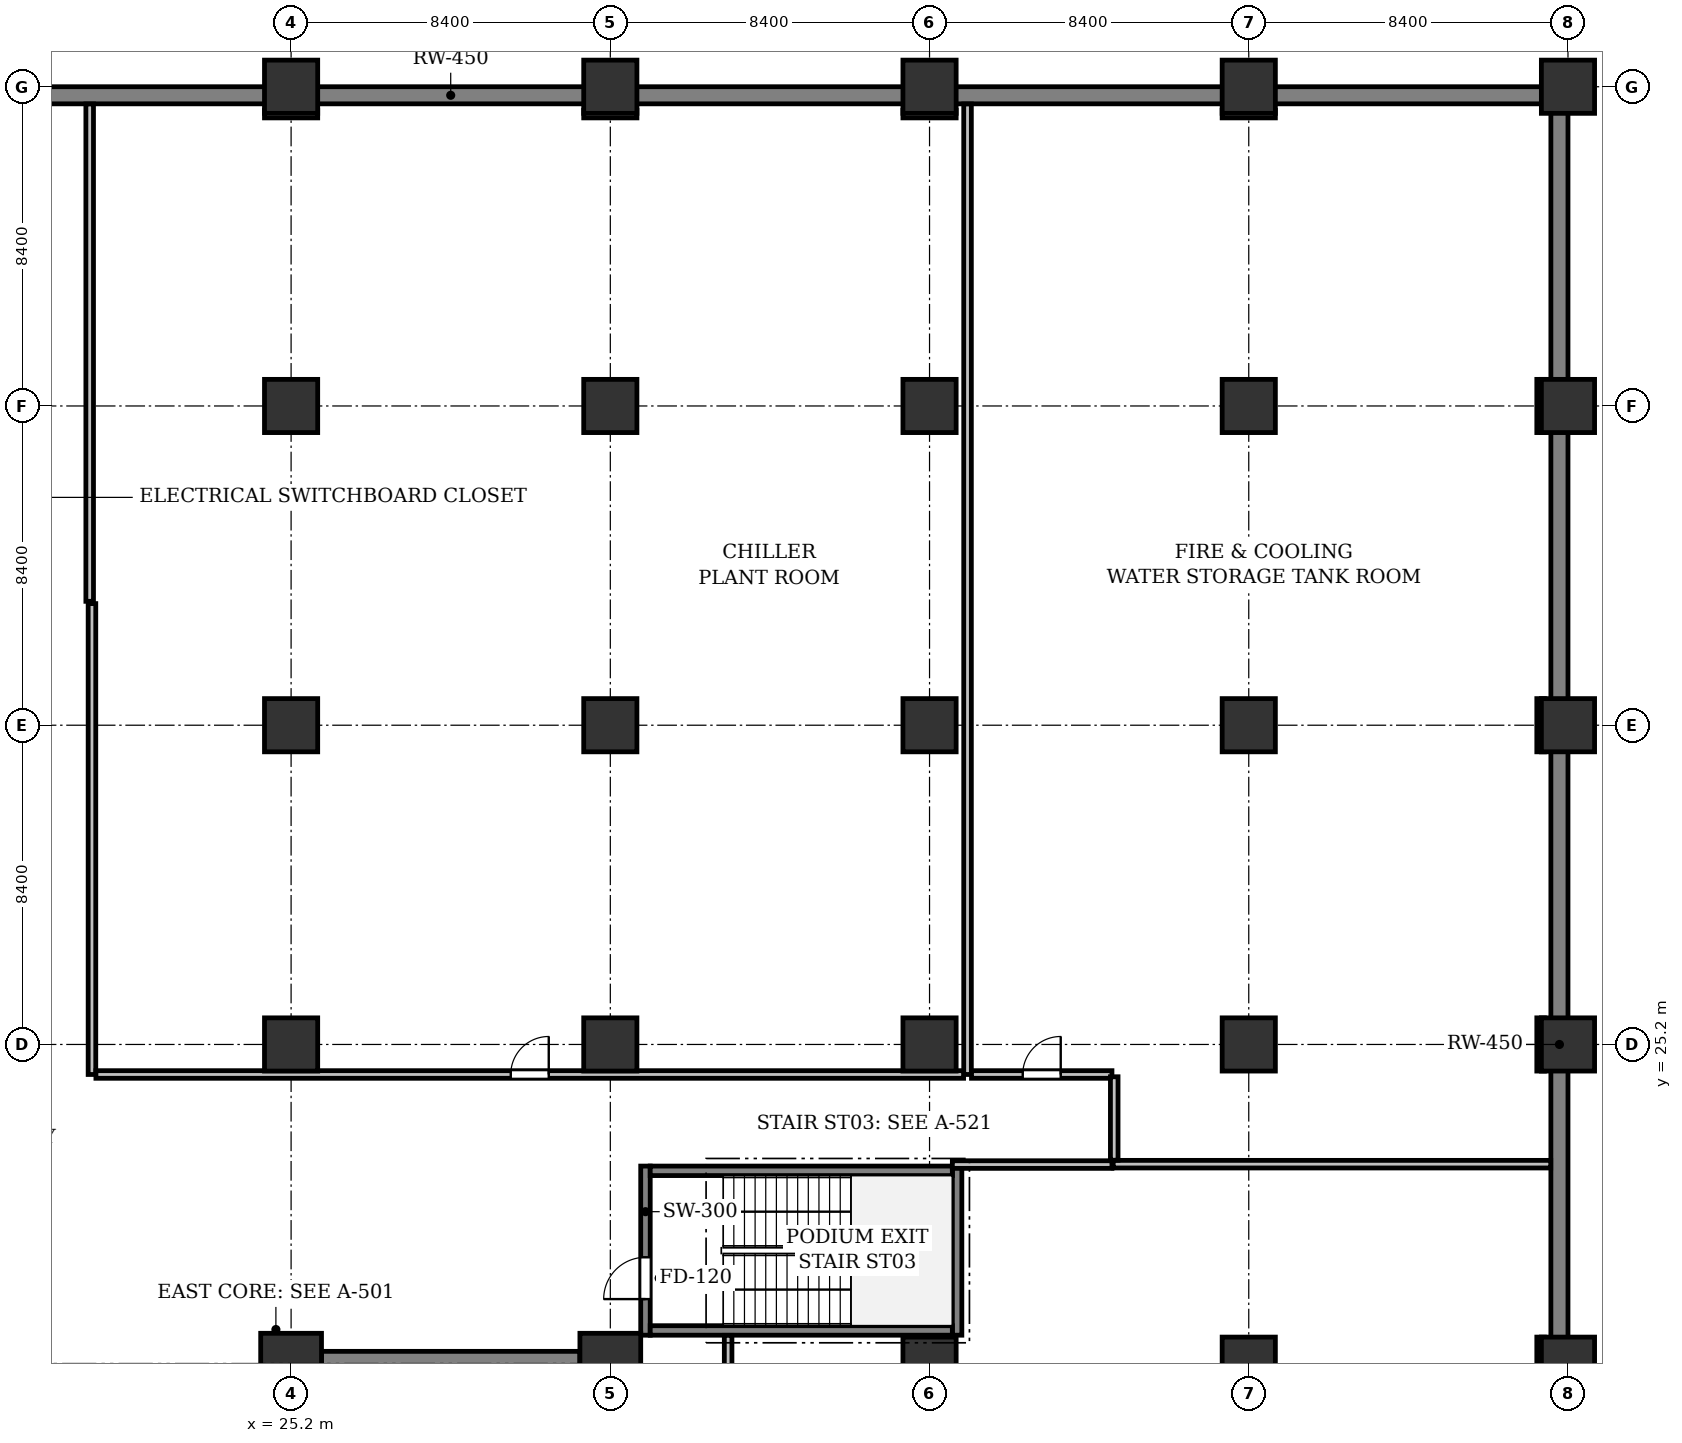
"""IFC4 building model, lengths in metres.
Left out: names, types, materials, properties, quantities, classifications, styles, units other than length and angle.
Written with IfcOpenShell. Run it as: python <this file> out.ifc"""

import sys

from ifc_helpers import new_model, si_unit, direction, frame, frame_2d, origin, origin_2d, place, context, subcontext, project, spatial, rectangle, extrude, element, fill, save


model = new_model("IFC4")
c1 = context("Model", 3, precision=1e-05, world=origin(), true_north=direction((0.0, 1.0)))
c2 = subcontext(c1, "Body", "Model", "MODEL_VIEW")
j1 = project(units=[si_unit("LENGTHUNIT", "METRE"), si_unit("PLANEANGLEUNIT", "RADIAN")], contexts=[c1])
p1 = place(None, origin())
s1 = spatial("IfcSite", under=j1, at=p1, CompositionType="ELEMENT")
p2 = place(p1, origin())
s2 = spatial("IfcBuilding", under=s1, at=p2, CompositionType="ELEMENT")
p3 = place(p2, frame((0.0, 0.0, -9.6)))
s3 = spatial("IfcBuildingStorey", under=s2, at=p3, CompositionType="ELEMENT", Elevation=-9.6)
p4 = place(p3, frame((0.0, 50.175, 0.0), z_axis=(0.0, 0.0, 1.0), x_axis=(1.0, 0.0, 0.0)))
e1 = element("IfcWall", 1, at=p4, inside=s3, PredefinedType="SOLIDWALL", context=c2, shape_type="SweptSolid", body=[
    extrude(rectangle(XDim=58.8, YDim=0.45, at=frame_2d((29.4, 0.0))), origin(), (0.0, 0.0, 1.0), 4.48),
])
p5 = place(p3, frame((58.575, 0.45, 0.0), z_axis=(0.0, 0.0, 1.0), x_axis=(0.0, 1.0, 0.0)))
e2 = element("IfcWall", 2, at=p5, inside=s3, PredefinedType="SOLIDWALL", context=c2, shape_type="SweptSolid", body=[
    extrude(rectangle(XDim=49.5, YDim=0.45, at=frame_2d((24.75, 0.0))), origin(), (0.0, 0.0, 1.0), 4.48),
])
p6 = place(p3, frame((25.2, 16.8, 0.0), z_axis=(0.0, 0.0, 1.0), x_axis=(1.0, 0.0, 0.0)))
e3 = element("IfcColumn", 3, at=p6, inside=s3, PredefinedType="COLUMN", context=c2, shape_type="SweptSolid", body=[
    extrude(rectangle(XDim=1.6, YDim=1.6, at=origin_2d()), origin(), (0.0, 0.0, 1.0), 4.8),
])
for number, where, z_axis, x_axis in (
    (4, (25.2, 25.2, 0.0), (0.0, 0.0, 1.0), (1.0, 0.0, 0.0)),
    (5, (25.2, 33.6, 0.0), (0.0, 0.0, 1.0), (1.0, 0.0, 0.0)),
    (6, (25.2, 42.0, 0.0), (0.0, 0.0, 1.0), (1.0, 0.0, 0.0)),
    (7, (25.2, 50.4, 0.0), (0.0, 0.0, 1.0), (1.0, 0.0, 0.0)),
):
    element("IfcColumn", number, at=place(p3, frame(where, z_axis=z_axis, x_axis=x_axis)), inside=s3, PredefinedType="COLUMN", context=c2, shape_type="SweptSolid", body=[
        extrude(rectangle(XDim=1.4, YDim=1.4, at=origin_2d()), origin(), (0.0, 0.0, 1.0), 4.8),
    ])
p7 = place(p3, frame((33.6, 16.8, 0.0), z_axis=(0.0, 0.0, 1.0), x_axis=(1.0, 0.0, 0.0)))
e8 = element("IfcColumn", 8, at=p7, inside=s3, PredefinedType="COLUMN", context=c2, shape_type="SweptSolid", body=[
    extrude(rectangle(XDim=1.6, YDim=1.6, at=origin_2d()), origin(), (0.0, 0.0, 1.0), 4.8),
])
for number, where, z_axis, x_axis in (
    (9, (33.6, 25.2, 0.0), (0.0, 0.0, 1.0), (1.0, 0.0, 0.0)),
    (10, (33.6, 33.6, 0.0), (0.0, 0.0, 1.0), (1.0, 0.0, 0.0)),
    (11, (33.6, 42.0, 0.0), (0.0, 0.0, 1.0), (1.0, 0.0, 0.0)),
    (12, (33.6, 50.4, 0.0), (0.0, 0.0, 1.0), (1.0, 0.0, 0.0)),
    (13, (42.0, 16.8, 0.0), (0.0, 0.0, 1.0), (1.0, 0.0, 0.0)),
    (14, (42.0, 25.2, 0.0), (0.0, 0.0, 1.0), (1.0, 0.0, 0.0)),
    (15, (42.0, 33.6, 0.0), (0.0, 0.0, 1.0), (1.0, 0.0, 0.0)),
    (16, (42.0, 42.0, 0.0), (0.0, 0.0, 1.0), (1.0, 0.0, 0.0)),
    (17, (42.0, 50.4, 0.0), (0.0, 0.0, 1.0), (1.0, 0.0, 0.0)),
    (18, (50.4, 16.8, 0.0), (0.0, 0.0, 1.0), (1.0, 0.0, 0.0)),
    (19, (50.4, 25.2, 0.0), (0.0, 0.0, 1.0), (1.0, 0.0, 0.0)),
    (20, (50.4, 33.6, 0.0), (0.0, 0.0, 1.0), (1.0, 0.0, 0.0)),
    (21, (50.4, 42.0, 0.0), (0.0, 0.0, 1.0), (1.0, 0.0, 0.0)),
    (22, (50.4, 50.4, 0.0), (0.0, 0.0, 1.0), (1.0, 0.0, 0.0)),
    (23, (58.8, 16.8, 0.0), (0.0, 0.0, 1.0), (1.0, 0.0, 0.0)),
    (24, (58.8, 25.2, 0.0), (0.0, 0.0, 1.0), (1.0, 0.0, 0.0)),
    (25, (58.8, 33.6, 0.0), (0.0, 0.0, 1.0), (1.0, 0.0, 0.0)),
    (26, (58.8, 42.0, 0.0), (0.0, 0.0, 1.0), (1.0, 0.0, 0.0)),
    (27, (58.8, 50.4, 0.0), (0.0, 0.0, 1.0), (1.0, 0.0, 0.0)),
):
    element("IfcColumn", number, at=place(p3, frame(where, z_axis=z_axis, x_axis=x_axis)), inside=s3, PredefinedType="COLUMN", context=c2, shape_type="SweptSolid", body=[
        extrude(rectangle(XDim=1.4, YDim=1.4, at=origin_2d()), origin(), (0.0, 0.0, 1.0), 4.8),
    ])
p8 = place(p3, frame((26.0, 16.8, 0.0), z_axis=(0.0, 0.0, 1.0), x_axis=(1.0, 0.0, 0.0)))
e28 = element("IfcWall", 28, at=p8, inside=s3, PredefinedType="SHEAR", context=c2, shape_type="SweptSolid", body=[
    extrude(rectangle(XDim=6.8, YDim=0.65, at=frame_2d((3.4, 0.0))), origin(), (0.0, 0.0, 1.0), 4.48),
])
p9 = place(p3, frame((34.525, 17.55, 0.0), z_axis=(0.0, 0.0, 1.0), x_axis=(0.0, 1.0, 0.0)))
e29 = element("IfcWall", 29, at=p9, inside=s3, PredefinedType="SHEAR", context=c2, shape_type="SweptSolid", body=[
    extrude(rectangle(XDim=4.45, YDim=0.25, at=frame_2d((2.225, 0.0))), origin(), (0.0, 0.0, 1.0), 4.48),
])
p10 = place(p9, frame((0.95, 0.0, 0.0)))
e30 = element("IfcOpeningElement", 30, at=p10, cuts=e29, PredefinedType="OPENING", context=c2, shape_type="SweptSolid", body=[
    extrude(rectangle(XDim=1.1, YDim=2.15, at=frame_2d((0.55, 1.075))), frame((0.0, 0.135, 0.0), z_axis=(0.0, -1.0, 0.0), x_axis=(1.0, 0.0, 0.0)), (0.0, 0.0, 1.0), 0.27),
])
p11 = place(p3, frame((42.725, 17.55, 0.0), z_axis=(0.0, 0.0, 1.0), x_axis=(0.0, 1.0, 0.0)))
e31 = element("IfcWall", 31, at=p11, inside=s3, PredefinedType="SHEAR", context=c2, shape_type="SweptSolid", body=[
    extrude(rectangle(XDim=4.45, YDim=0.25, at=frame_2d((2.225, 0.0))), origin(), (0.0, 0.0, 1.0), 4.48),
])
for number, where, z_axis, x_axis in (
    (32, (34.65, 17.675, 0.0), (0.0, 0.0, 1.0), (1.0, 0.0, 0.0)),
    (33, (34.65, 21.875, 0.0), (0.0, 0.0, 1.0), (1.0, 0.0, 0.0)),
):
    element("IfcWall", number, at=place(p3, frame(where, z_axis=z_axis, x_axis=x_axis)), inside=s3, PredefinedType="SHEAR", context=c2, shape_type="SweptSolid", body=[
        extrude(rectangle(XDim=7.95, YDim=0.25, at=frame_2d((3.975, 0.0))), origin(), (0.0, 0.0, 1.0), 4.48),
    ])
p12 = place(p3, frame((43.0, 24.41, 0.0), z_axis=(0.0, 0.0, 1.0), x_axis=(0.0, 1.0, 0.0)))
e34 = element("IfcWall", 34, at=p12, inside=s3, PredefinedType="PARTITIONING", context=c2, shape_type="SweptSolid", body=[
    extrude(rectangle(XDim=25.536, YDim=0.2, at=frame_2d((12.768, 0.0))), origin(), (0.0, 0.0, 1.0), 3.78),
])
p13 = place(p3, frame((42.7, 49.68, 0.0), z_axis=(0.0, 0.0, 1.0), x_axis=(-1.0, 0.0, 0.0)))
e35 = element("IfcWall", 35, at=p13, inside=s3, PredefinedType="PARTITIONING", context=c2, shape_type="SweptSolid", body=[
    extrude(rectangle(XDim=1.4, YDim=0.2, at=frame_2d((0.7, 0.0))), origin(), (0.0, 0.0, 1.0), 3.868),
])
p14 = place(p3, frame((34.3, 49.68, 0.0), z_axis=(0.0, 0.0, 1.0), x_axis=(-1.0, 0.0, 0.0)))
e36 = element("IfcWall", 36, at=p14, inside=s3, PredefinedType="PARTITIONING", context=c2, shape_type="SweptSolid", body=[
    extrude(rectangle(XDim=1.4, YDim=0.2, at=frame_2d((0.7, 0.0))), origin(), (0.0, 0.0, 1.0), 3.868),
])
p15 = place(p3, frame((25.9, 49.68, 0.0), z_axis=(0.0, 0.0, 1.0), x_axis=(-1.0, 0.0, 0.0)))
e37 = element("IfcWall", 37, at=p15, inside=s3, PredefinedType="PARTITIONING", context=c2, shape_type="SweptSolid", body=[
    extrude(rectangle(XDim=1.4, YDim=0.2, at=frame_2d((0.7, 0.0))), origin(), (0.0, 0.0, 1.0), 3.868),
])
p16 = place(p3, frame((19.9, 49.946, 0.0), z_axis=(0.0, 0.0, 1.0), x_axis=(0.0, -1.0, 0.0)))
e38 = element("IfcWall", 38, at=p16, inside=s3, PredefinedType="PARTITIONING", context=c2, shape_type="SweptSolid", body=[
    extrude(rectangle(XDim=13.086, YDim=0.2, at=frame_2d((6.543, 0.0))), origin(), (0.0, 0.0, 1.0), 3.78),
])
p17 = place(p3, frame((19.96, 36.8, 0.0), z_axis=(0.0, 0.0, 1.0), x_axis=(0.0, -1.0, 0.0)))
e39 = element("IfcWall", 39, at=p17, inside=s3, PredefinedType="PARTITIONING", context=c2, shape_type="SweptSolid", body=[
    extrude(rectangle(XDim=12.39, YDim=0.2, at=frame_2d((6.195, 0.0))), origin(), (0.0, 0.0, 1.0), 3.78),
])
p18 = place(p3, frame((20.064, 24.41, 0.0), z_axis=(0.0, 0.0, 1.0), x_axis=(1.0, 0.0, 0.0)))
e40 = element("IfcWall", 40, at=p18, inside=s3, PredefinedType="PARTITIONING", context=c2, shape_type="SweptSolid", body=[
    extrude(rectangle(XDim=22.832, YDim=0.2, at=frame_2d((11.416, 0.0))), origin(), (0.0, 0.0, 1.0), 3.868),
])
p19 = place(p18, frame((10.916, 0.0, 0.0)))
e41 = element("IfcOpeningElement", 41, at=p19, cuts=e40, PredefinedType="OPENING", context=c2, shape_type="SweptSolid", body=[
    extrude(rectangle(XDim=1.0, YDim=2.15, at=frame_2d((0.5, 1.075))), frame((0.0, 0.11, 0.0), z_axis=(0.0, -1.0, 0.0), x_axis=(1.0, 0.0, 0.0)), (0.0, 0.0, 1.0), 0.22),
])
p20 = place(p3, frame((58.08, 16.1, 0.0), z_axis=(0.0, 0.0, 1.0), x_axis=(0.0, 1.0, 0.0)))
e42 = element("IfcWall", 42, at=p20, inside=s3, PredefinedType="PARTITIONING", context=c2, shape_type="SweptSolid", body=[
    extrude(rectangle(XDim=1.4, YDim=0.2, at=frame_2d((0.7, 0.0))), origin(), (0.0, 0.0, 1.0), 3.78),
])
p21 = place(p3, frame((58.346, 22.05, 0.0), z_axis=(0.0, 0.0, 1.0), x_axis=(-1.0, 0.0, 0.0)))
e43 = element("IfcWall", 43, at=p21, inside=s3, PredefinedType="PARTITIONING", context=c2, shape_type="SweptSolid", body=[
    extrude(rectangle(XDim=11.513, YDim=0.2, at=frame_2d((5.756, 0.0))), origin(), (0.0, 0.0, 1.0), 3.868),
])
p22 = place(p3, frame((46.8, 22.04, 0.0), z_axis=(0.0, 0.0, 1.0), x_axis=(-1.0, 0.0, 0.0)))
e44 = element("IfcWall", 44, at=p22, inside=s3, PredefinedType="PARTITIONING", context=c2, shape_type="SweptSolid", body=[
    extrude(rectangle(XDim=4.2, YDim=0.2, at=frame_2d((2.1, 0.0))), origin(), (0.0, 0.0, 1.0), 4.074),
])
p23 = place(p3, frame((36.7, 17.546, 0.0), z_axis=(0.0, 0.0, 1.0), x_axis=(0.0, -1.0, 0.0)))
e45 = element("IfcWall", 45, at=p23, inside=s3, PredefinedType="PARTITIONING", context=c2, shape_type="SweptSolid", body=[
    extrude(rectangle(XDim=3.286, YDim=0.2, at=frame_2d((1.643, 0.0))), origin(), (0.0, 0.0, 1.0), 3.78),
])
p24 = place(p3, frame((58.08, 24.5, 0.0), z_axis=(0.0, 0.0, 1.0), x_axis=(0.0, 1.0, 0.0)))
e46 = element("IfcWall", 46, at=p24, inside=s3, PredefinedType="PARTITIONING", context=c2, shape_type="SweptSolid", body=[
    extrude(rectangle(XDim=1.4, YDim=0.2, at=frame_2d((0.7, 0.0))), origin(), (0.0, 0.0, 1.0), 3.78),
])
p25 = place(p3, frame((58.08, 32.9, 0.0), z_axis=(0.0, 0.0, 1.0), x_axis=(0.0, 1.0, 0.0)))
e47 = element("IfcWall", 47, at=p25, inside=s3, PredefinedType="PARTITIONING", context=c2, shape_type="SweptSolid", body=[
    extrude(rectangle(XDim=1.4, YDim=0.2, at=frame_2d((0.7, 0.0))), origin(), (0.0, 0.0, 1.0), 3.78),
])
p26 = place(p3, frame((58.08, 41.3, 0.0), z_axis=(0.0, 0.0, 1.0), x_axis=(0.0, 1.0, 0.0)))
e48 = element("IfcWall", 48, at=p26, inside=s3, PredefinedType="PARTITIONING", context=c2, shape_type="SweptSolid", body=[
    extrude(rectangle(XDim=1.4, YDim=0.2, at=frame_2d((0.7, 0.0))), origin(), (0.0, 0.0, 1.0), 3.78),
])
p27 = place(p3, frame((51.1, 49.68, 0.0), z_axis=(0.0, 0.0, 1.0), x_axis=(-1.0, 0.0, 0.0)))
e49 = element("IfcWall", 49, at=p27, inside=s3, PredefinedType="PARTITIONING", context=c2, shape_type="SweptSolid", body=[
    extrude(rectangle(XDim=1.4, YDim=0.2, at=frame_2d((0.7, 0.0))), origin(), (0.0, 0.0, 1.0), 3.868),
])
p28 = place(p3, frame((43.104, 24.41, 0.0), z_axis=(0.0, 0.0, 1.0), x_axis=(1.0, 0.0, 0.0)))
e50 = element("IfcWall", 50, at=p28, inside=s3, PredefinedType="PARTITIONING", context=c2, shape_type="SweptSolid", body=[
    extrude(rectangle(XDim=3.696, YDim=0.2, at=frame_2d((1.848, 0.0))), origin(), (0.0, 0.0, 1.0), 4.074),
])
p29 = place(p28, frame((1.348, 0.0, 0.0)))
e51 = element("IfcOpeningElement", 51, at=p29, cuts=e50, PredefinedType="OPENING", context=c2, shape_type="SweptSolid", body=[
    extrude(rectangle(XDim=1.0, YDim=2.15, at=frame_2d((0.5, 1.075))), frame((0.0, 0.11, 0.0), z_axis=(0.0, -1.0, 0.0), x_axis=(1.0, 0.0, 0.0)), (0.0, 0.0, 1.0), 0.22),
])
p30 = place(p3, frame((46.86, 24.35, 0.0), z_axis=(0.0, 0.0, 1.0), x_axis=(0.0, -1.0, 0.0)))
e52 = element("IfcWall", 52, at=p30, inside=s3, PredefinedType="PARTITIONING", context=c2, shape_type="SweptSolid", body=[
    extrude(rectangle(XDim=2.196, YDim=0.2, at=frame_2d((1.098, 0.0))), origin(), (0.0, 0.0, 1.0), 4.48),
])
p31 = place(p10, origin())
e53 = element("IfcDoor", 53, at=p31, inside=s3, OperationType="SINGLE_SWING_LEFT", PredefinedType="DOOR", context=c2, shape_type="SweptSolid", body=[
    extrude(rectangle(XDim=1.1, YDim=2.15, at=frame_2d((0.55, 1.075))), frame((0.0, 0.025, 0.0), z_axis=(0.0, -1.0, 0.0), x_axis=(1.0, 0.0, 0.0)), (0.0, 0.0, 1.0), 0.05),
])
fill(e30, e53)
p32 = place(p19, origin())
e54 = element("IfcDoor", 54, at=p32, inside=s3, OperationType="SINGLE_SWING_RIGHT", PredefinedType="DOOR", context=c2, shape_type="SweptSolid", body=[
    extrude(rectangle(XDim=1.0, YDim=2.15, at=frame_2d((0.5, 1.075))), frame((0.0, 0.025, 0.0), z_axis=(0.0, -1.0, 0.0), x_axis=(1.0, 0.0, 0.0)), (0.0, 0.0, 1.0), 0.05),
])
fill(e41, e54)
p33 = place(p29, origin())
e55 = element("IfcDoor", 55, at=p33, inside=s3, OperationType="SINGLE_SWING_RIGHT", PredefinedType="DOOR", context=c2, shape_type="SweptSolid", body=[
    extrude(rectangle(XDim=1.0, YDim=2.15, at=frame_2d((0.5, 1.075))), frame((0.0, 0.025, 0.0), z_axis=(0.0, -1.0, 0.0), x_axis=(1.0, 0.0, 0.0)), (0.0, 0.0, 1.0), 0.05),
])
fill(e51, e55)
save(model, sys.argv[1])
